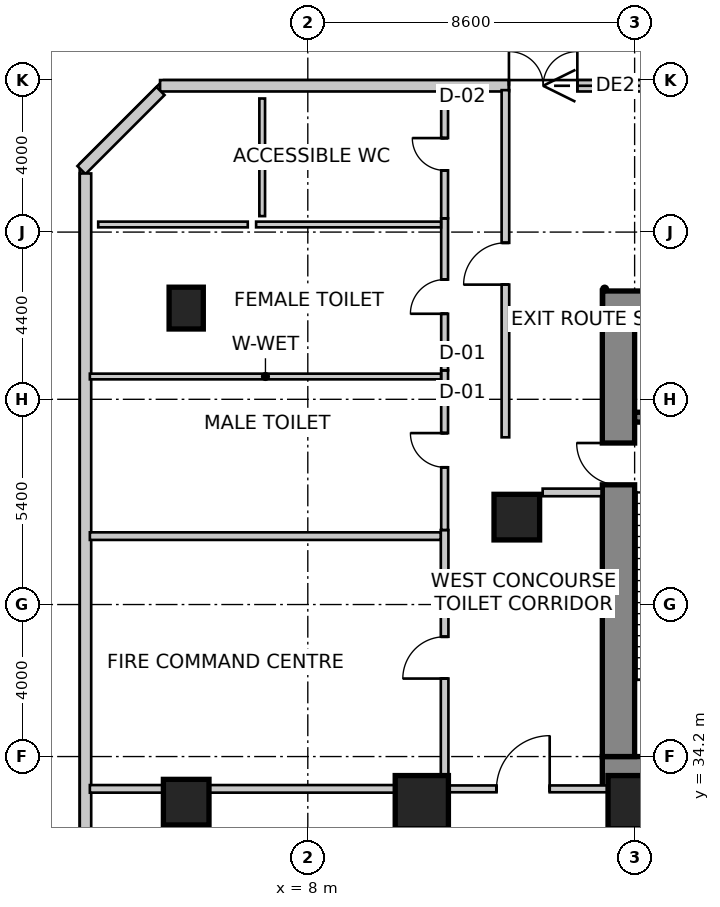
"""IFC4 building model, lengths in metres.
Left out: names, types, materials, properties, quantities, classifications, styles, units other than length and angle.
Written with IfcOpenShell. Run it as: python <this file> out.ifc"""

import sys

from ifc_helpers import new_model, si_unit, direction, frame, frame_2d, origin, origin_2d, place, context, subcontext, project, spatial, rectangle, extrude, source, transform, mapped, element, fill, save


model = new_model("IFC4")
c1 = context("Model", 3, precision=1e-05, world=origin(), true_north=direction((0.0, 1.0)))
c2 = subcontext(c1, "Body", "Model", "MODEL_VIEW")
j1 = project(units=[si_unit("LENGTHUNIT", "METRE"), si_unit("PLANEANGLEUNIT", "RADIAN")], contexts=[c1])
p1 = place(None, origin())
s1 = spatial("IfcSite", under=j1, at=p1, CompositionType="ELEMENT")
p2 = place(p1, origin())
s2 = spatial("IfcBuilding", under=s1, at=p2, CompositionType="ELEMENT")
p3 = place(p2, origin())
s3 = spatial("IfcBuildingStorey", under=s2, at=p3, CompositionType="ELEMENT", Elevation=0.0)
p4 = place(p3, frame((15.75, 46.025, 0.0), z_axis=(0.0, 0.0, 1.0), x_axis=(1.0, 0.0, 0.0)))
e1 = element("IfcWall", 1, at=p4, inside=s3, PredefinedType="SHEAR", context=c2, shape_type="SweptSolid", body=[
    extrude(rectangle(XDim=16.1, YDim=0.85, at=frame_2d((8.05, 0.0))), origin(), (0.0, 0.0, 1.0), 6.0),
])
p5 = place(p3, frame((15.75, 33.775, 0.0), z_axis=(0.0, 0.0, 1.0), x_axis=(1.0, 0.0, 0.0)))
e2 = element("IfcWall", 2, at=p5, inside=s3, PredefinedType="SHEAR", context=c2, shape_type="SweptSolid", body=[
    extrude(rectangle(XDim=16.1, YDim=0.85, at=frame_2d((8.05, 0.0))), origin(), (0.0, 0.0, 1.0), 6.0),
])
m1 = source(origin(), c2, "Body", "SweptSolid", [
    extrude(rectangle(XDim=1.3, YDim=2.15, at=frame_2d((0.65, 1.075))), frame((0.0, 0.435, 0.0), z_axis=(0.0, -1.0, 0.0), x_axis=(1.0, 0.0, 0.0)), (0.0, 0.0, 1.0), 0.87),
])
p6 = place(p5, frame((10.18, 0.0, 0.0)))
e3 = element("IfcOpeningElement", 3, at=p6, cuts=e2, PredefinedType="OPENING", context=c2, shape_type="MappedRepresentation", body=[
    mapped(m1, transform((0.0, 0.0, 0.0), scale=1.0)),
])
p7 = place(p3, frame((16.175, 34.2, 0.0), z_axis=(0.0, 0.0, 1.0), x_axis=(0.0, 1.0, 0.0)))
e4 = element("IfcWall", 4, at=p7, inside=s3, PredefinedType="SHEAR", context=c2, shape_type="SweptSolid", body=[
    extrude(rectangle(XDim=11.4, YDim=0.85, at=frame_2d((5.7, 0.0))), origin(), (0.0, 0.0, 1.0), 6.0),
])
m2 = source(origin(), c2, "Body", "SweptSolid", [
    extrude(rectangle(XDim=1.1, YDim=2.15, at=frame_2d((0.55, 1.075))), frame((0.0, 0.435, 0.0), z_axis=(0.0, -1.0, 0.0), x_axis=(1.0, 0.0, 0.0)), (0.0, 0.0, 1.0), 0.87),
])
p8 = place(p7, frame((7.15, 0.0, 0.0)))
e5 = element("IfcOpeningElement", 5, at=p8, cuts=e4, PredefinedType="OPENING", context=c2, shape_type="MappedRepresentation", body=[
    mapped(m2, transform((0.0, 0.0, 0.0), scale=1.0)),
])
p9 = place(p3, frame((16.6, 43.13, 0.0), z_axis=(0.0, 0.0, 1.0), x_axis=(1.0, 0.0, 0.0)))
e6 = element("IfcWall", 6, at=p9, inside=s3, PredefinedType="SHEAR", context=c2, shape_type="SweptSolid", body=[
    extrude(rectangle(XDim=3.5, YDim=0.26, at=frame_2d((1.75, 0.0))), origin(), (0.0, 0.0, 1.0), 6.0),
])
m3 = source(origin(), c2, "Body", "SweptSolid", [
    extrude(rectangle(XDim=1.2, YDim=1.2, at=origin_2d()), origin(), (0.0, 0.0, 1.0), 6.0),
])
p10 = place(p3, frame((4.8, 33.0, 0.0), z_axis=(0.0, 0.0, 1.0), x_axis=(1.0, 0.0, 0.0)))
e7 = element("IfcColumn", 7, at=p10, inside=s3, PredefinedType="COLUMN", context=c2, shape_type="MappedRepresentation", body=[
    mapped(m3, transform((0.0, 0.0, 0.0), scale=1.0)),
])
m4 = source(origin(), c2, "Body", "SweptSolid", [
    extrude(rectangle(XDim=1.4, YDim=1.4, at=origin_2d()), origin(), (0.0, 0.0, 1.0), 6.0),
])
for number, where, z_axis, x_axis in (
    (8, (11.0, 33.0, 0.0), (0.0, 0.0, 1.0), (1.0, 0.0, 0.0)),
    (9, (16.6, 33.0, 0.0), (0.0, 0.0, 1.0), (1.0, 0.0, 0.0)),
):
    element("IfcColumn", number, at=place(p3, frame(where, z_axis=z_axis, x_axis=x_axis)), inside=s3, PredefinedType="COLUMN", context=c2, shape_type="MappedRepresentation", body=[
        mapped(m4, transform((0.0, 0.0, 0.0), scale=1.0)),
    ])
m5 = source(origin(), c2, "Body", "SweptSolid", [
    extrude(rectangle(XDim=0.9, YDim=1.1, at=origin_2d()), origin(), (0.0, 0.0, 1.0), 6.0),
])
p11 = place(p3, frame((4.8, 46.0, 0.0), z_axis=(0.0, 0.0, 1.0), x_axis=(1.0, 0.0, 0.0)))
e10 = element("IfcColumn", 10, at=p11, inside=s3, PredefinedType="COLUMN", context=c2, shape_type="MappedRepresentation", body=[
    mapped(m5, transform((0.0, 0.0, 0.0), scale=1.0)),
])
p12 = place(p3, frame((13.5, 40.5, 0.0), z_axis=(0.0, 0.0, 1.0), x_axis=(1.0, 0.0, 0.0)))
e11 = element("IfcColumn", 11, at=p12, inside=s3, PredefinedType="COLUMN", context=c2, shape_type="MappedRepresentation", body=[
    mapped(m3, transform((0.0, 0.0, 0.0), scale=1.0)),
])
p13 = place(p3, frame((4.112, 51.85, 0.0), z_axis=(0.0, 0.0, 1.0), x_axis=(1.0, 0.0, 0.0)))
e12 = element("IfcWall", 12, at=p13, inside=s3, PredefinedType="SOLIDWALL", context=c2, shape_type="SweptSolid", body=[
    extrude(rectangle(XDim=61.431, YDim=0.3, at=frame_2d((30.715, 0.0))), origin(), (0.0, 0.0, 1.0), 5.7),
])
m6 = source(origin(), c2, "Body", "SweptSolid", [
    extrude(rectangle(XDim=2.4, YDim=2.8, at=frame_2d((1.2, 1.4))), frame((0.0, 0.16, 0.0), z_axis=(0.0, -1.0, 0.0), x_axis=(1.0, 0.0, 0.0)), (0.0, 0.0, 1.0), 0.32),
])
p14 = place(p13, frame((42.531, 0.0, 0.0)))
e13 = element("IfcOpeningElement", 13, at=p14, cuts=e12, PredefinedType="OPENING", context=c2, shape_type="MappedRepresentation", body=[
    mapped(m6, transform((0.0, 0.0, 0.0), scale=1.0)),
])
p15 = place(p13, frame((35.031, 0.0, 0.0)))
e14 = element("IfcOpeningElement", 14, at=p15, cuts=e12, PredefinedType="OPENING", context=c2, shape_type="MappedRepresentation", body=[
    mapped(m6, transform((0.0, 0.0, 0.0), scale=1.0)),
])
p16 = place(p13, frame((29.831, 0.0, 0.0)))
e15 = element("IfcOpeningElement", 15, at=p16, cuts=e12, PredefinedType="OPENING", context=c2, shape_type="MappedRepresentation", body=[
    mapped(m6, transform((0.0, 0.0, 0.0), scale=1.0)),
])
m7 = source(origin(), c2, "Body", "SweptSolid", [
    extrude(rectangle(XDim=1.8, YDim=2.4, at=frame_2d((0.9, 1.2))), frame((0.0, 0.16, 0.0), z_axis=(0.0, -1.0, 0.0), x_axis=(1.0, 0.0, 0.0)), (0.0, 0.0, 1.0), 0.32),
])
p17 = place(p13, frame((9.181, 0.0, 0.0)))
e16 = element("IfcOpeningElement", 16, at=p17, cuts=e12, PredefinedType="OPENING", context=c2, shape_type="MappedRepresentation", body=[
    mapped(m7, transform((0.0, 0.0, 0.0), scale=1.0)),
])
p18 = place(p3, frame((2.044, 49.632, 0.0), z_axis=(0.0, 0.0, 1.0), x_axis=(0.707106781187, 0.707106781187, 0.0)))
e17 = element("IfcWall", 17, at=p18, inside=s3, PredefinedType="SOLIDWALL", context=c2, shape_type="SweptSolid", body=[
    extrude(rectangle(XDim=2.942, YDim=0.3, at=frame_2d((1.471, 0.0))), origin(), (0.0, 0.0, 1.0), 5.7),
])
p19 = place(p3, frame((2.15, 4.112, 0.0), z_axis=(0.0, 0.0, 1.0), x_axis=(0.0, 1.0, 0.0)))
e18 = element("IfcWall", 18, at=p19, inside=s3, PredefinedType="SOLIDWALL", context=c2, shape_type="SweptSolid", body=[
    extrude(rectangle(XDim=45.431, YDim=0.3, at=frame_2d((22.715, 0.0))), origin(), (0.0, 0.0, 1.0), 5.7),
])
p20 = place(p19, frame((19.231, 0.0, 0.0)))
e19 = element("IfcOpeningElement", 19, at=p20, cuts=e18, PredefinedType="OPENING", context=c2, shape_type="MappedRepresentation", body=[
    mapped(m6, transform((0.0, 0.0, 0.0), scale=1.0)),
])
p21 = place(p19, frame((12.831, 0.0, 0.0)))
e20 = element("IfcOpeningElement", 20, at=p21, cuts=e18, PredefinedType="OPENING", context=c2, shape_type="MappedRepresentation", body=[
    mapped(m6, transform((0.0, 0.0, 0.0), scale=1.0)),
])
p22 = place(p19, frame((4.131, 0.0, 0.0)))
e21 = element("IfcOpeningElement", 21, at=p22, cuts=e18, PredefinedType="OPENING", context=c2, shape_type="MappedRepresentation", body=[
    mapped(m7, transform((0.0, 0.0, 0.0), scale=1.0)),
])
p23 = place(p3, frame((13.2, 42.6, 0.0), z_axis=(0.0, 0.0, 1.0), x_axis=(0.0, 1.0, 0.0)))
e22 = element("IfcWall", 22, at=p23, inside=s3, PredefinedType="SOLIDWALL", context=c2, shape_type="SweptSolid", body=[
    extrude(rectangle(XDim=9.135, YDim=0.2, at=frame_2d((4.567, 0.0))), origin(), (0.0, 0.0, 1.0), 5.7),
])
m8 = source(origin(), c2, "Body", "SweptSolid", [
    extrude(rectangle(XDim=1.1, YDim=2.15, at=frame_2d((0.55, 1.075))), frame((0.0, 0.11, 0.0), z_axis=(0.0, -1.0, 0.0), x_axis=(1.0, 0.0, 0.0)), (0.0, 0.0, 1.0), 0.22),
])
p24 = place(p23, frame((4.018, 0.0, 0.0)))
e23 = element("IfcOpeningElement", 23, at=p24, cuts=e22, PredefinedType="OPENING", context=c2, shape_type="MappedRepresentation", body=[
    mapped(m8, transform((0.0, 0.0, 0.0), scale=1.0)),
])
p25 = place(p3, frame((15.73, 41.15, 0.0), z_axis=(0.0, 0.0, 1.0), x_axis=(-1.0, 0.0, 0.0)))
e24 = element("IfcWall", 24, at=p25, inside=s3, PredefinedType="SOLIDWALL", context=c2, shape_type="SweptSolid", body=[
    extrude(rectangle(XDim=1.55, YDim=0.2, at=frame_2d((0.775, 0.0))), origin(), (0.0, 0.0, 1.0), 5.7),
])
p26 = place(p3, frame((11.44, 33.35, 0.0), z_axis=(0.0, 0.0, 1.0), x_axis=(1.0, 0.0, 0.0)))
e25 = element("IfcWall", 25, at=p26, inside=s3, PredefinedType="PARTITIONING", context=c2, shape_type="SweptSolid", body=[
    extrude(rectangle(XDim=4.45, YDim=0.18, at=frame_2d((2.225, 0.0))), origin(), (0.0, 0.0, 1.0), 4.492),
])
m9 = source(origin(), c2, "Body", "SweptSolid", [
    extrude(rectangle(XDim=1.4, YDim=2.15, at=frame_2d((0.7, 1.075))), frame((0.0, 0.1, 0.0), z_axis=(0.0, -1.0, 0.0), x_axis=(1.0, 0.0, 0.0)), (0.0, 0.0, 1.0), 0.2),
])
p27 = place(p26, frame((1.525, 0.0, 0.0)))
e26 = element("IfcOpeningElement", 26, at=p27, cuts=e25, PredefinedType="OPENING", context=c2, shape_type="MappedRepresentation", body=[
    mapped(m9, transform((0.0, 0.0, 0.0), scale=1.0)),
])
p28 = place(p3, frame((2.265, 33.35, 0.0), z_axis=(0.0, 0.0, 1.0), x_axis=(1.0, 0.0, 0.0)))
e27 = element("IfcWall", 27, at=p28, inside=s3, PredefinedType="SOLIDWALL", context=c2, shape_type="SweptSolid", body=[
    extrude(rectangle(XDim=9.173, YDim=0.2, at=frame_2d((4.586, 0.0))), origin(), (0.0, 0.0, 1.0), 4.492),
])
p29 = place(p3, frame((11.6, 33.444, 0.0), z_axis=(0.0, 0.0, 1.0), x_axis=(0.0, 1.0, 0.0)))
e28 = element("IfcWall", 28, at=p29, inside=s3, PredefinedType="SOLIDWALL", context=c2, shape_type="SweptSolid", body=[
    extrude(rectangle(XDim=6.716, YDim=0.2, at=frame_2d((3.358, 0.0))), origin(), (0.0, 0.0, 1.0), 4.742),
])
p30 = place(p29, frame((2.808, 0.0, 0.0)))
e29 = element("IfcOpeningElement", 29, at=p30, cuts=e28, PredefinedType="OPENING", context=c2, shape_type="MappedRepresentation", body=[
    mapped(m8, transform((0.0, 0.0, 0.0), scale=1.0)),
])
p31 = place(p3, frame((11.6, 40.162, 0.0), z_axis=(0.0, 0.0, 1.0), x_axis=(0.0, 1.0, 0.0)))
e30 = element("IfcWall", 30, at=p31, inside=s3, PredefinedType="PARTITIONING", context=c2, shape_type="SweptSolid", body=[
    extrude(rectangle(XDim=4.198, YDim=0.18, at=frame_2d((2.099, 0.0))), origin(), (0.0, 0.0, 1.0), 4.742),
])
m10 = source(origin(), c2, "Body", "SweptSolid", [
    extrude(rectangle(XDim=0.9, YDim=2.15, at=frame_2d((0.45, 1.075))), frame((0.0, 0.1, 0.0), z_axis=(0.0, -1.0, 0.0), x_axis=(1.0, 0.0, 0.0)), (0.0, 0.0, 1.0), 0.2),
])
p32 = place(p31, frame((1.649, 0.0, 0.0)))
e31 = element("IfcOpeningElement", 31, at=p32, cuts=e30, PredefinedType="OPENING", context=c2, shape_type="MappedRepresentation", body=[
    mapped(m10, transform((0.0, 0.0, 0.0), scale=1.0)),
])
p33 = place(p3, frame((11.6, 44.362, 0.0), z_axis=(0.0, 0.0, 1.0), x_axis=(0.0, 1.0, 0.0)))
e32 = element("IfcWall", 32, at=p33, inside=s3, PredefinedType="PARTITIONING", context=c2, shape_type="SweptSolid", body=[
    extrude(rectangle(XDim=3.998, YDim=0.18, at=frame_2d((1.999, 0.0))), origin(), (0.0, 0.0, 1.0), 5.7),
])
p34 = place(p33, frame((1.489, 0.0, 0.0)))
e33 = element("IfcOpeningElement", 33, at=p34, cuts=e32, PredefinedType="OPENING", context=c2, shape_type="MappedRepresentation", body=[
    mapped(m10, transform((0.0, 0.0, 0.0), scale=1.0)),
])
p35 = place(p3, frame((11.6, 48.362, 0.0), z_axis=(0.0, 0.0, 1.0), x_axis=(0.0, 1.0, 0.0)))
e34 = element("IfcWall", 34, at=p35, inside=s3, PredefinedType="PARTITIONING", context=c2, shape_type="SweptSolid", body=[
    extrude(rectangle(XDim=3.373, YDim=0.18, at=frame_2d((1.687, 0.0))), origin(), (0.0, 0.0, 1.0), 5.7),
])
m11 = source(origin(), c2, "Body", "SweptSolid", [
    extrude(rectangle(XDim=0.85, YDim=2.15, at=frame_2d((0.425, 1.075))), frame((0.0, 0.1, 0.0), z_axis=(0.0, -1.0, 0.0), x_axis=(1.0, 0.0, 0.0)), (0.0, 0.0, 1.0), 0.2),
])
p36 = place(p35, frame((1.261, 0.0, 0.0)))
e35 = element("IfcOpeningElement", 35, at=p36, cuts=e34, PredefinedType="OPENING", context=c2, shape_type="MappedRepresentation", body=[
    mapped(m11, transform((0.0, 0.0, 0.0), scale=1.0)),
])
p37 = place(p3, frame((2.265, 40.0, 0.0), z_axis=(0.0, 0.0, 1.0), x_axis=(1.0, 0.0, 0.0)))
e36 = element("IfcWall", 36, at=p37, inside=s3, PredefinedType="SOLIDWALL", context=c2, shape_type="SweptSolid", body=[
    extrude(rectangle(XDim=9.231, YDim=0.2, at=frame_2d((4.616, 0.0))), origin(), (0.0, 0.0, 1.0), 4.742),
])
p38 = place(p3, frame((2.265, 44.2, 0.0), z_axis=(0.0, 0.0, 1.0), x_axis=(1.0, 0.0, 0.0)))
e37 = element("IfcWall", 37, at=p38, inside=s3, PredefinedType="PARTITIONING", context=c2, shape_type="SweptSolid", body=[
    extrude(rectangle(XDim=9.241, YDim=0.15, at=frame_2d((4.621, 0.0))), origin(), (0.0, 0.0, 1.0), 4.742),
])
p39 = place(p3, frame((6.64, 48.2, 0.0), z_axis=(0.0, 0.0, 1.0), x_axis=(1.0, 0.0, 0.0)))
e38 = element("IfcWall", 38, at=p39, inside=s3, PredefinedType="PARTITIONING", context=c2, shape_type="SweptSolid", body=[
    extrude(rectangle(XDim=4.866, YDim=0.15, at=frame_2d((2.433, 0.0))), origin(), (0.0, 0.0, 1.0), 5.7),
])
p40 = place(p3, frame((2.485, 48.2, 0.0), z_axis=(0.0, 0.0, 1.0), x_axis=(1.0, 0.0, 0.0)))
e39 = element("IfcWall", 39, at=p40, inside=s3, PredefinedType="PARTITIONING", context=c2, shape_type="SweptSolid", body=[
    extrude(rectangle(XDim=3.935, YDim=0.15, at=frame_2d((1.967, 0.0))), origin(), (0.0, 0.0, 1.0), 5.7),
])
p41 = place(p3, frame((6.8, 48.42, 0.0), z_axis=(0.0, 0.0, 1.0), x_axis=(0.0, 1.0, 0.0)))
e40 = element("IfcWall", 40, at=p41, inside=s3, PredefinedType="PARTITIONING", context=c2, shape_type="SweptSolid", body=[
    extrude(rectangle(XDim=3.095, YDim=0.15, at=frame_2d((1.547, 0.0))), origin(), (0.0, 0.0, 1.0), 5.7),
])
m12 = source(origin(), c2, "Body", "SweptSolid", [
    extrude(rectangle(XDim=1.8, YDim=2.4, at=frame_2d((0.9, 1.2))), frame((0.0, 0.025, 0.0), z_axis=(0.0, -1.0, 0.0), x_axis=(1.0, 0.0, 0.0)), (0.0, 0.0, 1.0), 0.05),
])
p42 = place(p17, origin())
e41 = element("IfcDoor", 41, at=p42, inside=s3, OperationType="DOUBLE_DOOR_SINGLE_SWING", PredefinedType="DOOR", context=c2, shape_type="MappedRepresentation", body=[
    mapped(m12, transform((0.0, 0.0, 0.0), scale=1.0)),
])
fill(e16, e41)
m13 = source(origin(), c2, "Body", "SweptSolid", [
    extrude(rectangle(XDim=1.1, YDim=2.15, at=frame_2d((0.55, 1.075))), frame((0.0, 0.025, 0.0), z_axis=(0.0, -1.0, 0.0), x_axis=(1.0, 0.0, 0.0)), (0.0, 0.0, 1.0), 0.05),
])
p43 = place(p8, origin())
e42 = element("IfcDoor", 42, at=p43, inside=s3, OperationType="SINGLE_SWING_RIGHT", PredefinedType="DOOR", context=c2, shape_type="MappedRepresentation", body=[
    mapped(m13, transform((0.0, 0.0, 0.0), scale=1.0)),
])
fill(e5, e42)
m14 = source(origin(), c2, "Body", "SweptSolid", [
    extrude(rectangle(XDim=1.4, YDim=2.15, at=frame_2d((0.7, 1.075))), frame((0.0, 0.025, 0.0), z_axis=(0.0, -1.0, 0.0), x_axis=(1.0, 0.0, 0.0)), (0.0, 0.0, 1.0), 0.05),
])
p44 = place(p27, origin())
e43 = element("IfcDoor", 43, at=p44, inside=s3, OperationType="SINGLE_SWING_RIGHT", PredefinedType="DOOR", context=c2, shape_type="MappedRepresentation", body=[
    mapped(m14, transform((0.0, 0.0, 0.0), scale=1.0)),
])
fill(e26, e43)
p45 = place(p30, origin())
e44 = element("IfcDoor", 44, at=p45, inside=s3, OperationType="SINGLE_SWING_LEFT", PredefinedType="DOOR", context=c2, shape_type="MappedRepresentation", body=[
    mapped(m13, transform((0.0, 0.0, 0.0), scale=1.0)),
])
fill(e29, e44)
m15 = source(origin(), c2, "Body", "SweptSolid", [
    extrude(rectangle(XDim=0.9, YDim=2.15, at=frame_2d((0.45, 1.075))), frame((0.0, 0.025, 0.0), z_axis=(0.0, -1.0, 0.0), x_axis=(1.0, 0.0, 0.0)), (0.0, 0.0, 1.0), 0.05),
])
p46 = place(p32, origin())
e45 = element("IfcDoor", 45, at=p46, inside=s3, OperationType="SINGLE_SWING_RIGHT", PredefinedType="DOOR", context=c2, shape_type="MappedRepresentation", body=[
    mapped(m15, transform((0.0, 0.0, 0.0), scale=1.0)),
])
fill(e31, e45)
p47 = place(p34, origin())
e46 = element("IfcDoor", 46, at=p47, inside=s3, OperationType="SINGLE_SWING_LEFT", PredefinedType="DOOR", context=c2, shape_type="MappedRepresentation", body=[
    mapped(m15, transform((0.0, 0.0, 0.0), scale=1.0)),
])
fill(e33, e46)
m16 = source(origin(), c2, "Body", "SweptSolid", [
    extrude(rectangle(XDim=0.85, YDim=2.15, at=frame_2d((0.425, 1.075))), frame((0.0, 0.025, 0.0), z_axis=(0.0, -1.0, 0.0), x_axis=(1.0, 0.0, 0.0)), (0.0, 0.0, 1.0), 0.05),
])
p48 = place(p36, origin())
e47 = element("IfcDoor", 47, at=p48, inside=s3, OperationType="SINGLE_SWING_RIGHT", PredefinedType="DOOR", context=c2, shape_type="MappedRepresentation", body=[
    mapped(m16, transform((0.0, 0.0, 0.0), scale=1.0)),
])
fill(e35, e47)
p49 = place(p24, origin())
e48 = element("IfcDoor", 48, at=p49, inside=s3, OperationType="SINGLE_SWING_LEFT", PredefinedType="DOOR", context=c2, shape_type="MappedRepresentation", body=[
    mapped(m13, transform((0.0, 0.0, 0.0), scale=1.0)),
])
fill(e23, e48)
save(model, sys.argv[1])
